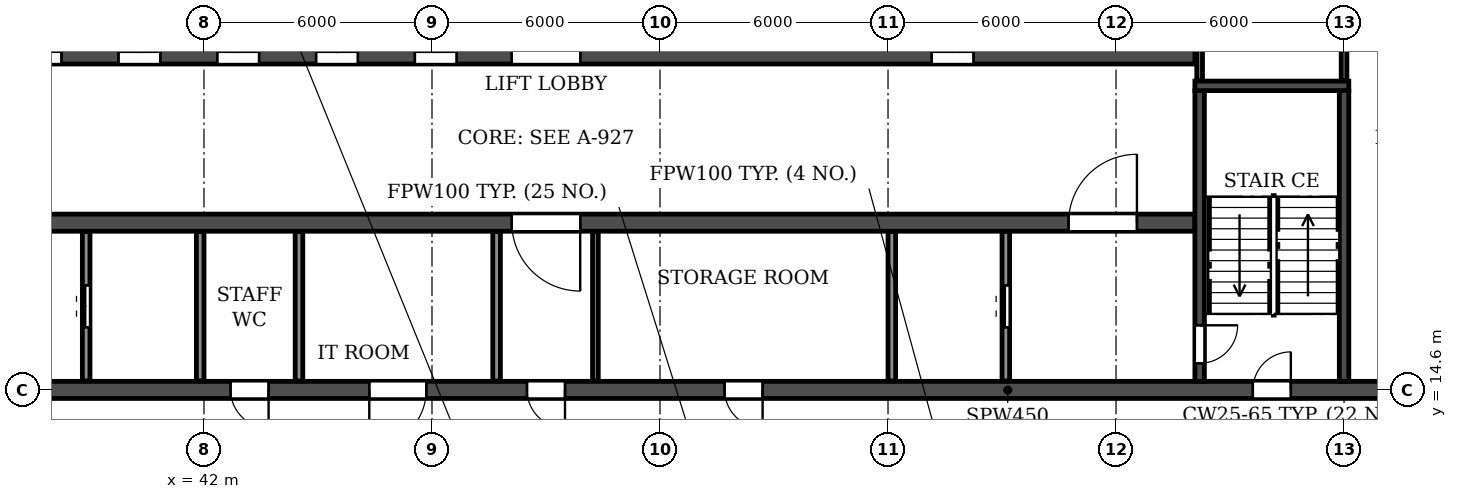
"""IFC4 building model, lengths in metres.
Left out: names, types, materials, properties, quantities, classifications, styles, units other than length and angle.
Written with IfcOpenShell. Run it as: python <this file> out.ifc"""

import sys

from ifc_helpers import new_model, si_unit, direction, frame, frame_2d, origin, place, context, subcontext, project, spatial, rectangle, extrude, element, fill, save


model = new_model("IFC4")
c1 = context("Model", 3, precision=1e-05, world=origin(), true_north=direction((0.0, 1.0)))
c2 = subcontext(c1, "Body", "Model", "MODEL_VIEW")
j1 = project(units=[si_unit("LENGTHUNIT", "METRE"), si_unit("PLANEANGLEUNIT", "RADIAN")], contexts=[c1])
p1 = place(None, origin())
s1 = spatial("IfcSite", under=j1, at=p1, CompositionType="ELEMENT")
p2 = place(p1, origin())
s2 = spatial("IfcBuilding", under=s1, at=p2, CompositionType="ELEMENT")
p3 = place(p2, frame((0.0, 0.0, 152.1)))
s3 = spatial("IfcBuildingStorey", under=s2, at=p3, CompositionType="ELEMENT", Elevation=152.1)
p4 = place(p3, frame((12.2, 14.6, 0.0), z_axis=(0.0, 0.0, 1.0), x_axis=(1.0, 0.0, 0.0)))
e1 = element("IfcWall", 1, at=p4, inside=s3, PredefinedType="SOLIDWALL", context=c2, shape_type="SweptSolid", body=[
    extrude(rectangle(XDim=77.6, YDim=0.45, at=frame_2d((38.8, 0.0))), origin(), (0.0, 0.0, 1.0), 3.07),
])
p5 = place(p4, frame((2.3, 0.0, 0.0)))
e2 = element("IfcOpeningElement", 2, at=p5, cuts=e1, PredefinedType="OPENING", context=c2, shape_type="SweptSolid", body=[
    extrude(rectangle(XDim=1.0, YDim=2.1, at=frame_2d((0.5, 1.05))), frame((0.0, 0.235, 0.0), z_axis=(0.0, -1.0, 0.0), x_axis=(1.0, 0.0, 0.0)), (0.0, 0.0, 1.0), 0.47),
])
p6 = place(p4, frame((6.7, 0.0, 0.0)))
e3 = element("IfcOpeningElement", 3, at=p6, cuts=e1, PredefinedType="OPENING", context=c2, shape_type="SweptSolid", body=[
    extrude(rectangle(XDim=1.0, YDim=2.1, at=frame_2d((0.5, 1.05))), frame((0.0, 0.235, 0.0), z_axis=(0.0, -1.0, 0.0), x_axis=(1.0, 0.0, 0.0)), (0.0, 0.0, 1.0), 0.47),
])
p7 = place(p4, frame((14.6, 0.0, 0.0)))
e4 = element("IfcOpeningElement", 4, at=p7, cuts=e1, PredefinedType="OPENING", context=c2, shape_type="SweptSolid", body=[
    extrude(rectangle(XDim=1.0, YDim=2.1, at=frame_2d((0.5, 1.05))), frame((0.0, 0.235, 0.0), z_axis=(0.0, -1.0, 0.0), x_axis=(1.0, 0.0, 0.0)), (0.0, 0.0, 1.0), 0.47),
])
p8 = place(p4, frame((19.2, 0.0, 0.0)))
e5 = element("IfcOpeningElement", 5, at=p8, cuts=e1, PredefinedType="OPENING", context=c2, shape_type="SweptSolid", body=[
    extrude(rectangle(XDim=1.0, YDim=2.1, at=frame_2d((0.5, 1.05))), frame((0.0, 0.235, 0.0), z_axis=(0.0, -1.0, 0.0), x_axis=(1.0, 0.0, 0.0)), (0.0, 0.0, 1.0), 0.47),
])
p9 = place(p4, frame((30.5, 0.0, 0.0)))
e6 = element("IfcOpeningElement", 6, at=p9, cuts=e1, PredefinedType="OPENING", context=c2, shape_type="SweptSolid", body=[
    extrude(rectangle(XDim=1.0, YDim=2.1, at=frame_2d((0.5, 1.05))), frame((0.0, 0.235, 0.0), z_axis=(0.0, -1.0, 0.0), x_axis=(1.0, 0.0, 0.0)), (0.0, 0.0, 1.0), 0.47),
])
p10 = place(p4, frame((34.15, 0.0, 0.0)))
e7 = element("IfcOpeningElement", 7, at=p10, cuts=e1, PredefinedType="OPENING", context=c2, shape_type="SweptSolid", body=[
    extrude(rectangle(XDim=1.5, YDim=2.1, at=frame_2d((0.75, 1.05))), frame((0.0, 0.235, 0.0), z_axis=(0.0, -1.0, 0.0), x_axis=(1.0, 0.0, 0.0)), (0.0, 0.0, 1.0), 0.47),
])
p11 = place(p4, frame((38.3, 0.0, 0.0)))
e8 = element("IfcOpeningElement", 8, at=p11, cuts=e1, PredefinedType="OPENING", context=c2, shape_type="SweptSolid", body=[
    extrude(rectangle(XDim=1.0, YDim=2.1, at=frame_2d((0.5, 1.05))), frame((0.0, 0.235, 0.0), z_axis=(0.0, -1.0, 0.0), x_axis=(1.0, 0.0, 0.0)), (0.0, 0.0, 1.0), 0.47),
])
p12 = place(p4, frame((43.5, 0.0, 0.0)))
e9 = element("IfcOpeningElement", 9, at=p12, cuts=e1, PredefinedType="OPENING", context=c2, shape_type="SweptSolid", body=[
    extrude(rectangle(XDim=1.0, YDim=2.1, at=frame_2d((0.5, 1.05))), frame((0.0, 0.235, 0.0), z_axis=(0.0, -1.0, 0.0), x_axis=(1.0, 0.0, 0.0)), (0.0, 0.0, 1.0), 0.47),
])
p13 = place(p4, frame((57.4, 0.0, 0.0)))
e10 = element("IfcOpeningElement", 10, at=p13, cuts=e1, PredefinedType="OPENING", context=c2, shape_type="SweptSolid", body=[
    extrude(rectangle(XDim=1.0, YDim=2.1, at=frame_2d((0.5, 1.05))), frame((0.0, 0.235, 0.0), z_axis=(0.0, -1.0, 0.0), x_axis=(1.0, 0.0, 0.0)), (0.0, 0.0, 1.0), 0.47),
])
p14 = place(p4, frame((62.0, 0.0, 0.0)))
e11 = element("IfcOpeningElement", 11, at=p14, cuts=e1, PredefinedType="OPENING", context=c2, shape_type="SweptSolid", body=[
    extrude(rectangle(XDim=1.0, YDim=2.1, at=frame_2d((0.5, 1.05))), frame((0.0, 0.235, 0.0), z_axis=(0.0, -1.0, 0.0), x_axis=(1.0, 0.0, 0.0)), (0.0, 0.0, 1.0), 0.47),
])
p15 = place(p4, frame((69.9, 0.0, 0.0)))
e12 = element("IfcOpeningElement", 12, at=p15, cuts=e1, PredefinedType="OPENING", context=c2, shape_type="SweptSolid", body=[
    extrude(rectangle(XDim=1.0, YDim=2.1, at=frame_2d((0.5, 1.05))), frame((0.0, 0.235, 0.0), z_axis=(0.0, -1.0, 0.0), x_axis=(1.0, 0.0, 0.0)), (0.0, 0.0, 1.0), 0.47),
])
p16 = place(p4, frame((74.3, 0.0, 0.0)))
e13 = element("IfcOpeningElement", 13, at=p16, cuts=e1, PredefinedType="OPENING", context=c2, shape_type="SweptSolid", body=[
    extrude(rectangle(XDim=1.0, YDim=2.1, at=frame_2d((0.5, 1.05))), frame((0.0, 0.235, 0.0), z_axis=(0.0, -1.0, 0.0), x_axis=(1.0, 0.0, 0.0)), (0.0, 0.0, 1.0), 0.47),
])
p17 = place(p3, frame((33.925, 19.0, 0.0), z_axis=(0.0, 0.0, 1.0), x_axis=(1.0, 0.0, 0.0)))
e14 = element("IfcWall", 14, at=p17, inside=s3, PredefinedType="SOLIDWALL", context=c2, shape_type="SweptSolid", body=[
    extrude(rectangle(XDim=34.15, YDim=0.45, at=frame_2d((17.075, 0.0))), origin(), (0.0, 0.0, 1.0), 3.07),
])
p18 = place(p17, frame((16.175, 0.0, 0.0)))
e15 = element("IfcOpeningElement", 15, at=p18, cuts=e14, PredefinedType="OPENING", context=c2, shape_type="SweptSolid", body=[
    extrude(rectangle(XDim=1.8, YDim=2.1, at=frame_2d((0.9, 1.05))), frame((0.0, 0.235, 0.0), z_axis=(0.0, -1.0, 0.0), x_axis=(1.0, 0.0, 0.0)), (0.0, 0.0, 1.0), 0.47),
])
p19 = place(p17, frame((1.525, 0.0, 0.0)))
e16 = element("IfcOpeningElement", 16, at=p19, cuts=e14, PredefinedType="OPENING", context=c2, shape_type="SweptSolid", body=[
    extrude(rectangle(XDim=1.8, YDim=2.1, at=frame_2d((0.9, 1.05))), frame((0.0, 0.235, 0.0), z_axis=(0.0, -1.0, 0.0), x_axis=(1.0, 0.0, 0.0)), (0.0, 0.0, 1.0), 0.47),
])
p20 = place(p17, frame((30.825, 0.0, 0.0)))
e17 = element("IfcOpeningElement", 17, at=p20, cuts=e14, PredefinedType="OPENING", context=c2, shape_type="SweptSolid", body=[
    extrude(rectangle(XDim=1.8, YDim=2.1, at=frame_2d((0.9, 1.05))), frame((0.0, 0.235, 0.0), z_axis=(0.0, -1.0, 0.0), x_axis=(1.0, 0.0, 0.0)), (0.0, 0.0, 1.0), 0.47),
])
p21 = place(p3, frame((33.925, 23.4, 0.0), z_axis=(0.0, 0.0, 1.0), x_axis=(1.0, 0.0, 0.0)))
e18 = element("IfcWall", 18, at=p21, inside=s3, PredefinedType="SOLIDWALL", context=c2, shape_type="SweptSolid", body=[
    extrude(rectangle(XDim=34.15, YDim=0.45, at=frame_2d((17.075, 0.0))), origin(), (0.0, 0.0, 1.0), 3.07),
])
p22 = place(p21, frame((16.175, 0.0, 0.0)))
e19 = element("IfcOpeningElement", 19, at=p22, cuts=e18, PredefinedType="OPENING", context=c2, shape_type="SweptSolid", body=[
    extrude(rectangle(XDim=1.8, YDim=2.1, at=frame_2d((0.9, 1.05))), frame((0.0, 0.235, 0.0), z_axis=(0.0, -1.0, 0.0), x_axis=(1.0, 0.0, 0.0)), (0.0, 0.0, 1.0), 0.47),
])
p23 = place(p21, frame((0.625, 0.0, 0.0)))
e20 = element("IfcOpeningElement", 20, at=p23, cuts=e18, PredefinedType="OPENING", context=c2, shape_type="SweptSolid", body=[
    extrude(rectangle(XDim=1.1, YDim=2.1, at=frame_2d((0.55, 1.05))), frame((0.0, 0.235, 0.0), z_axis=(0.0, -1.0, 0.0), x_axis=(1.0, 0.0, 0.0)), (0.0, 0.0, 1.0), 0.47),
])
p24 = place(p21, frame((3.225, 0.0, 0.0)))
e21 = element("IfcOpeningElement", 21, at=p24, cuts=e18, PredefinedType="OPENING", context=c2, shape_type="SweptSolid", body=[
    extrude(rectangle(XDim=1.1, YDim=2.1, at=frame_2d((0.55, 1.05))), frame((0.0, 0.235, 0.0), z_axis=(0.0, -1.0, 0.0), x_axis=(1.0, 0.0, 0.0)), (0.0, 0.0, 1.0), 0.47),
])
p25 = place(p21, frame((5.825, 0.0, 0.0)))
e22 = element("IfcOpeningElement", 22, at=p25, cuts=e18, PredefinedType="OPENING", context=c2, shape_type="SweptSolid", body=[
    extrude(rectangle(XDim=1.1, YDim=2.1, at=frame_2d((0.55, 1.05))), frame((0.0, 0.235, 0.0), z_axis=(0.0, -1.0, 0.0), x_axis=(1.0, 0.0, 0.0)), (0.0, 0.0, 1.0), 0.47),
])
p26 = place(p21, frame((8.425, 0.0, 0.0)))
e23 = element("IfcOpeningElement", 23, at=p26, cuts=e18, PredefinedType="OPENING", context=c2, shape_type="SweptSolid", body=[
    extrude(rectangle(XDim=1.1, YDim=2.1, at=frame_2d((0.55, 1.05))), frame((0.0, 0.235, 0.0), z_axis=(0.0, -1.0, 0.0), x_axis=(1.0, 0.0, 0.0)), (0.0, 0.0, 1.0), 0.47),
])
p27 = place(p21, frame((11.025, 0.0, 0.0)))
e24 = element("IfcOpeningElement", 24, at=p27, cuts=e18, PredefinedType="OPENING", context=c2, shape_type="SweptSolid", body=[
    extrude(rectangle(XDim=1.1, YDim=2.1, at=frame_2d((0.55, 1.05))), frame((0.0, 0.235, 0.0), z_axis=(0.0, -1.0, 0.0), x_axis=(1.0, 0.0, 0.0)), (0.0, 0.0, 1.0), 0.47),
])
p28 = place(p21, frame((13.625, 0.0, 0.0)))
e25 = element("IfcOpeningElement", 25, at=p28, cuts=e18, PredefinedType="OPENING", context=c2, shape_type="SweptSolid", body=[
    extrude(rectangle(XDim=1.1, YDim=2.1, at=frame_2d((0.55, 1.05))), frame((0.0, 0.235, 0.0), z_axis=(0.0, -1.0, 0.0), x_axis=(1.0, 0.0, 0.0)), (0.0, 0.0, 1.0), 0.47),
])
p29 = place(p21, frame((27.225, 0.0, 0.0)))
e26 = element("IfcOpeningElement", 26, at=p29, cuts=e18, PredefinedType="OPENING", context=c2, shape_type="SweptSolid", body=[
    extrude(rectangle(XDim=1.1, YDim=2.1, at=frame_2d((0.55, 1.05))), frame((0.0, 0.235, 0.0), z_axis=(0.0, -1.0, 0.0), x_axis=(1.0, 0.0, 0.0)), (0.0, 0.0, 1.0), 0.47),
])
p30 = place(p3, frame((68.2, 14.825, 0.0), z_axis=(0.0, 0.0, 1.0), x_axis=(0.0, 1.0, 0.0)))
e27 = element("IfcWall", 27, at=p30, inside=s3, PredefinedType="SOLIDWALL", context=c2, shape_type="SweptSolid", body=[
    extrude(rectangle(XDim=7.65, YDim=0.25, at=frame_2d((3.825, 0.0))), origin(), (0.0, 0.0, 1.0), 3.07),
])
p31 = place(p30, frame((0.475, 0.0, 0.0)))
e28 = element("IfcOpeningElement", 28, at=p31, cuts=e27, PredefinedType="OPENING", context=c2, shape_type="SweptSolid", body=[
    extrude(rectangle(XDim=1.0, YDim=2.1, at=frame_2d((0.5, 1.05))), frame((0.0, 0.135, 0.0), z_axis=(0.0, -1.0, 0.0), x_axis=(1.0, 0.0, 0.0)), (0.0, 0.0, 1.0), 0.27),
])
p32 = place(p3, frame((72.0, 14.825, 0.0), z_axis=(0.0, 0.0, 1.0), x_axis=(0.0, 1.0, 0.0)))
e29 = element("IfcWall", 29, at=p32, inside=s3, PredefinedType="SOLIDWALL", context=c2, shape_type="SweptSolid", body=[
    extrude(rectangle(XDim=7.65, YDim=0.25, at=frame_2d((3.825, 0.0))), origin(), (0.0, 0.0, 1.0), 3.07),
])
p33 = place(p3, frame((68.075, 22.6, 0.0), z_axis=(0.0, 0.0, 1.0), x_axis=(1.0, 0.0, 0.0)))
e30 = element("IfcWall", 30, at=p33, inside=s3, PredefinedType="SOLIDWALL", context=c2, shape_type="SweptSolid", body=[
    extrude(rectangle(XDim=4.05, YDim=0.25, at=frame_2d((2.025, 0.0))), origin(), (0.0, 0.0, 1.0), 3.07),
])
p34 = place(p3, frame((52.3, 14.835, 0.0), z_axis=(0.0, 0.0, 1.0), x_axis=(0.0, 1.0, 0.0)))
e31 = element("IfcWall", 31, at=p34, inside=s3, PredefinedType="PARTITIONING", context=c2, shape_type="SweptSolid", body=[
    extrude(rectangle(XDim=3.93, YDim=0.15, at=frame_2d((1.965, 0.0))), origin(), (0.0, 0.0, 1.0), 3.07),
])
for number, where, z_axis, x_axis in (
    (32, (44.5, 14.835, 0.0), (0.0, 0.0, 1.0), (0.0, 1.0, 0.0)),
    (33, (49.7, 14.835, 0.0), (0.0, 0.0, 1.0), (0.0, 1.0, 0.0)),
):
    element("IfcWall", number, at=place(p3, frame(where, z_axis=z_axis, x_axis=x_axis)), inside=s3, PredefinedType="PARTITIONING", context=c2, shape_type="SweptSolid", body=[
        extrude(rectangle(XDim=3.93, YDim=0.2, at=frame_2d((1.965, 0.0))), origin(), (0.0, 0.0, 1.0), 3.07),
    ])
for number, where, z_axis, x_axis in (
    (34, (68.2, 22.735, 0.0), (0.0, 0.0, 1.0), (0.0, 1.0, 0.0)),
    (35, (72.0, 22.735, 0.0), (0.0, 0.0, 1.0), (0.0, 1.0, 0.0)),
):
    element("IfcWall", number, at=place(p3, frame(where, z_axis=z_axis, x_axis=x_axis)), inside=s3, PredefinedType="PARTITIONING", context=c2, shape_type="SweptSolid", body=[
        extrude(rectangle(XDim=4.83, YDim=0.15, at=frame_2d((2.415, 0.0))), origin(), (0.0, 0.0, 1.0), 3.07),
    ])
p35 = place(p3, frame((38.9, 14.835, 0.0), z_axis=(0.0, 0.0, 1.0), x_axis=(0.0, 1.0, 0.0)))
e36 = element("IfcWall", 36, at=p35, inside=s3, PredefinedType="PARTITIONING", context=c2, shape_type="SweptSolid", body=[
    extrude(rectangle(XDim=3.93, YDim=0.2, at=frame_2d((1.965, 0.0))), origin(), (0.0, 0.0, 1.0), 3.07),
])
p36 = place(p35, frame((1.415, 0.0, 0.0)))
e37 = element("IfcOpeningElement", 37, at=p36, cuts=e36, PredefinedType="OPENING", context=c2, shape_type="SweptSolid", body=[
    extrude(rectangle(XDim=1.1, YDim=2.1, at=frame_2d((0.55, 1.05))), frame((0.0, 0.11, 0.0), z_axis=(0.0, -1.0, 0.0), x_axis=(1.0, 0.0, 0.0)), (0.0, 0.0, 1.0), 0.22),
])
for number, where, z_axis, x_axis in (
    (38, (41.9, 14.835, 0.0), (0.0, 0.0, 1.0), (0.0, 1.0, 0.0)),
    (39, (60.1, 14.835, 0.0), (0.0, 0.0, 1.0), (0.0, 1.0, 0.0)),
):
    element("IfcWall", number, at=place(p3, frame(where, z_axis=z_axis, x_axis=x_axis)), inside=s3, PredefinedType="PARTITIONING", context=c2, shape_type="SweptSolid", body=[
        extrude(rectangle(XDim=3.93, YDim=0.2, at=frame_2d((1.965, 0.0))), origin(), (0.0, 0.0, 1.0), 3.07),
    ])
p37 = place(p3, frame((63.1, 14.835, 0.0), z_axis=(0.0, 0.0, 1.0), x_axis=(0.0, 1.0, 0.0)))
e40 = element("IfcWall", 40, at=p37, inside=s3, PredefinedType="PARTITIONING", context=c2, shape_type="SweptSolid", body=[
    extrude(rectangle(XDim=3.93, YDim=0.2, at=frame_2d((1.965, 0.0))), origin(), (0.0, 0.0, 1.0), 3.07),
])
p38 = place(p37, frame((1.415, 0.0, 0.0)))
e41 = element("IfcOpeningElement", 41, at=p38, cuts=e40, PredefinedType="OPENING", context=c2, shape_type="SweptSolid", body=[
    extrude(rectangle(XDim=1.1, YDim=2.1, at=frame_2d((0.55, 1.05))), frame((0.0, 0.11, 0.0), z_axis=(0.0, -1.0, 0.0), x_axis=(1.0, 0.0, 0.0)), (0.0, 0.0, 1.0), 0.22),
])
p39 = place(p9, frame((1.0, 0.0, 0.0), z_axis=(0.0, 0.0, 1.0), x_axis=(-1.0, 0.0, 0.0)))
e42 = element("IfcDoor", 42, at=p39, inside=s3, OperationType="SINGLE_SWING_LEFT", PredefinedType="DOOR", context=c2, shape_type="SweptSolid", body=[
    extrude(rectangle(XDim=1.0, YDim=2.1, at=frame_2d((0.5, 1.05))), frame((0.0, 0.025, 0.0), z_axis=(0.0, -1.0, 0.0), x_axis=(1.0, 0.0, 0.0)), (0.0, 0.0, 1.0), 0.05),
])
fill(e6, e42)
p40 = place(p10, frame((1.5, 0.0, 0.0), z_axis=(0.0, 0.0, 1.0), x_axis=(-1.0, 0.0, 0.0)))
e43 = element("IfcDoor", 43, at=p40, inside=s3, OperationType="DOUBLE_DOOR_SINGLE_SWING", PredefinedType="DOOR", context=c2, shape_type="SweptSolid", body=[
    extrude(rectangle(XDim=1.5, YDim=2.1, at=frame_2d((0.75, 1.05))), frame((0.0, 0.025, 0.0), z_axis=(0.0, -1.0, 0.0), x_axis=(1.0, 0.0, 0.0)), (0.0, 0.0, 1.0), 0.05),
])
fill(e7, e43)
p41 = place(p11, frame((1.0, 0.0, 0.0), z_axis=(0.0, 0.0, 1.0), x_axis=(-1.0, 0.0, 0.0)))
e44 = element("IfcDoor", 44, at=p41, inside=s3, OperationType="SINGLE_SWING_LEFT", PredefinedType="DOOR", context=c2, shape_type="SweptSolid", body=[
    extrude(rectangle(XDim=1.0, YDim=2.1, at=frame_2d((0.5, 1.05))), frame((0.0, 0.025, 0.0), z_axis=(0.0, -1.0, 0.0), x_axis=(1.0, 0.0, 0.0)), (0.0, 0.0, 1.0), 0.05),
])
fill(e8, e44)
p42 = place(p12, frame((1.0, 0.0, 0.0), z_axis=(0.0, 0.0, 1.0), x_axis=(-1.0, 0.0, 0.0)))
e45 = element("IfcDoor", 45, at=p42, inside=s3, OperationType="SINGLE_SWING_LEFT", PredefinedType="DOOR", context=c2, shape_type="SweptSolid", body=[
    extrude(rectangle(XDim=1.0, YDim=2.1, at=frame_2d((0.5, 1.05))), frame((0.0, 0.025, 0.0), z_axis=(0.0, -1.0, 0.0), x_axis=(1.0, 0.0, 0.0)), (0.0, 0.0, 1.0), 0.05),
])
fill(e9, e45)
p43 = place(p13, origin())
e46 = element("IfcDoor", 46, at=p43, inside=s3, OperationType="SINGLE_SWING_RIGHT", PredefinedType="DOOR", context=c2, shape_type="SweptSolid", body=[
    extrude(rectangle(XDim=1.0, YDim=2.1, at=frame_2d((0.5, 1.05))), frame((0.0, 0.025, 0.0), z_axis=(0.0, -1.0, 0.0), x_axis=(1.0, 0.0, 0.0)), (0.0, 0.0, 1.0), 0.05),
])
fill(e10, e46)
p44 = place(p38, origin())
e47 = element("IfcDoor", 47, at=p44, inside=s3, OperationType="DOUBLE_DOOR_SLIDING", PredefinedType="DOOR", context=c2, shape_type="SweptSolid", body=[
    extrude(rectangle(XDim=1.1, YDim=2.1, at=frame_2d((0.55, 1.05))), frame((0.0, 0.025, 0.0), z_axis=(0.0, -1.0, 0.0), x_axis=(1.0, 0.0, 0.0)), (0.0, 0.0, 1.0), 0.05),
])
fill(e41, e47)
p45 = place(p31, frame((1.0, 0.0, 0.0), z_axis=(0.0, 0.0, 1.0), x_axis=(-1.0, 0.0, 0.0)))
e48 = element("IfcDoor", 48, at=p45, inside=s3, OperationType="SINGLE_SWING_LEFT", PredefinedType="DOOR", context=c2, shape_type="SweptSolid", body=[
    extrude(rectangle(XDim=1.0, YDim=2.1, at=frame_2d((0.5, 1.05))), frame((0.0, 0.025, 0.0), z_axis=(0.0, -1.0, 0.0), x_axis=(1.0, 0.0, 0.0)), (0.0, 0.0, 1.0), 0.05),
])
fill(e28, e48)
p46 = place(p36, origin())
e49 = element("IfcDoor", 49, at=p46, inside=s3, OperationType="DOUBLE_DOOR_SLIDING", PredefinedType="DOOR", context=c2, shape_type="SweptSolid", body=[
    extrude(rectangle(XDim=1.1, YDim=2.1, at=frame_2d((0.55, 1.05))), frame((0.0, 0.025, 0.0), z_axis=(0.0, -1.0, 0.0), x_axis=(1.0, 0.0, 0.0)), (0.0, 0.0, 1.0), 0.05),
])
fill(e37, e49)
p47 = place(p22, origin())
e50 = element("IfcDoor", 50, at=p47, inside=s3, OperationType="DOUBLE_DOOR_SINGLE_SWING", PredefinedType="DOOR", context=c2, shape_type="SweptSolid", body=[
    extrude(rectangle(XDim=1.8, YDim=2.1, at=frame_2d((0.9, 1.05))), frame((0.0, 0.025, 0.0), z_axis=(0.0, -1.0, 0.0), x_axis=(1.0, 0.0, 0.0)), (0.0, 0.0, 1.0), 0.05),
])
fill(e19, e50)
p48 = place(p18, frame((1.8, 0.0, 0.0), z_axis=(0.0, 0.0, 1.0), x_axis=(-1.0, 0.0, 0.0)))
e51 = element("IfcDoor", 51, at=p48, inside=s3, OperationType="DOUBLE_DOOR_SINGLE_SWING", PredefinedType="DOOR", context=c2, shape_type="SweptSolid", body=[
    extrude(rectangle(XDim=1.8, YDim=2.1, at=frame_2d((0.9, 1.05))), frame((0.0, 0.025, 0.0), z_axis=(0.0, -1.0, 0.0), x_axis=(1.0, 0.0, 0.0)), (0.0, 0.0, 1.0), 0.05),
])
fill(e15, e51)
p49 = place(p24, origin())
e52 = element("IfcDoor", 52, at=p49, inside=s3, OperationType="DOUBLE_DOOR_SLIDING", PredefinedType="DOOR", context=c2, shape_type="SweptSolid", body=[
    extrude(rectangle(XDim=1.1, YDim=2.1, at=frame_2d((0.55, 1.05))), frame((0.0, 0.025, 0.0), z_axis=(0.0, -1.0, 0.0), x_axis=(1.0, 0.0, 0.0)), (0.0, 0.0, 1.0), 0.05),
])
fill(e21, e52)
p50 = place(p25, origin())
e53 = element("IfcDoor", 53, at=p50, inside=s3, OperationType="DOUBLE_DOOR_SLIDING", PredefinedType="DOOR", context=c2, shape_type="SweptSolid", body=[
    extrude(rectangle(XDim=1.1, YDim=2.1, at=frame_2d((0.55, 1.05))), frame((0.0, 0.025, 0.0), z_axis=(0.0, -1.0, 0.0), x_axis=(1.0, 0.0, 0.0)), (0.0, 0.0, 1.0), 0.05),
])
fill(e22, e53)
p51 = place(p26, origin())
e54 = element("IfcDoor", 54, at=p51, inside=s3, OperationType="DOUBLE_DOOR_SLIDING", PredefinedType="DOOR", context=c2, shape_type="SweptSolid", body=[
    extrude(rectangle(XDim=1.1, YDim=2.1, at=frame_2d((0.55, 1.05))), frame((0.0, 0.025, 0.0), z_axis=(0.0, -1.0, 0.0), x_axis=(1.0, 0.0, 0.0)), (0.0, 0.0, 1.0), 0.05),
])
fill(e23, e54)
p52 = place(p27, origin())
e55 = element("IfcDoor", 55, at=p52, inside=s3, OperationType="DOUBLE_DOOR_SLIDING", PredefinedType="DOOR", context=c2, shape_type="SweptSolid", body=[
    extrude(rectangle(XDim=1.1, YDim=2.1, at=frame_2d((0.55, 1.05))), frame((0.0, 0.025, 0.0), z_axis=(0.0, -1.0, 0.0), x_axis=(1.0, 0.0, 0.0)), (0.0, 0.0, 1.0), 0.05),
])
fill(e24, e55)
p53 = place(p28, origin())
e56 = element("IfcDoor", 56, at=p53, inside=s3, OperationType="DOUBLE_DOOR_SLIDING", PredefinedType="DOOR", context=c2, shape_type="SweptSolid", body=[
    extrude(rectangle(XDim=1.1, YDim=2.1, at=frame_2d((0.55, 1.05))), frame((0.0, 0.025, 0.0), z_axis=(0.0, -1.0, 0.0), x_axis=(1.0, 0.0, 0.0)), (0.0, 0.0, 1.0), 0.05),
])
fill(e25, e56)
p54 = place(p29, origin())
e57 = element("IfcDoor", 57, at=p54, inside=s3, OperationType="DOUBLE_DOOR_SLIDING", PredefinedType="DOOR", context=c2, shape_type="SweptSolid", body=[
    extrude(rectangle(XDim=1.1, YDim=2.1, at=frame_2d((0.55, 1.05))), frame((0.0, 0.025, 0.0), z_axis=(0.0, -1.0, 0.0), x_axis=(1.0, 0.0, 0.0)), (0.0, 0.0, 1.0), 0.05),
])
fill(e26, e57)
p55 = place(p20, origin())
e58 = element("IfcDoor", 58, at=p55, inside=s3, OperationType="DOUBLE_DOOR_SINGLE_SWING", PredefinedType="DOOR", context=c2, shape_type="SweptSolid", body=[
    extrude(rectangle(XDim=1.8, YDim=2.1, at=frame_2d((0.9, 1.05))), frame((0.0, 0.025, 0.0), z_axis=(0.0, -1.0, 0.0), x_axis=(1.0, 0.0, 0.0)), (0.0, 0.0, 1.0), 0.05),
])
fill(e17, e58)
save(model, sys.argv[1])
